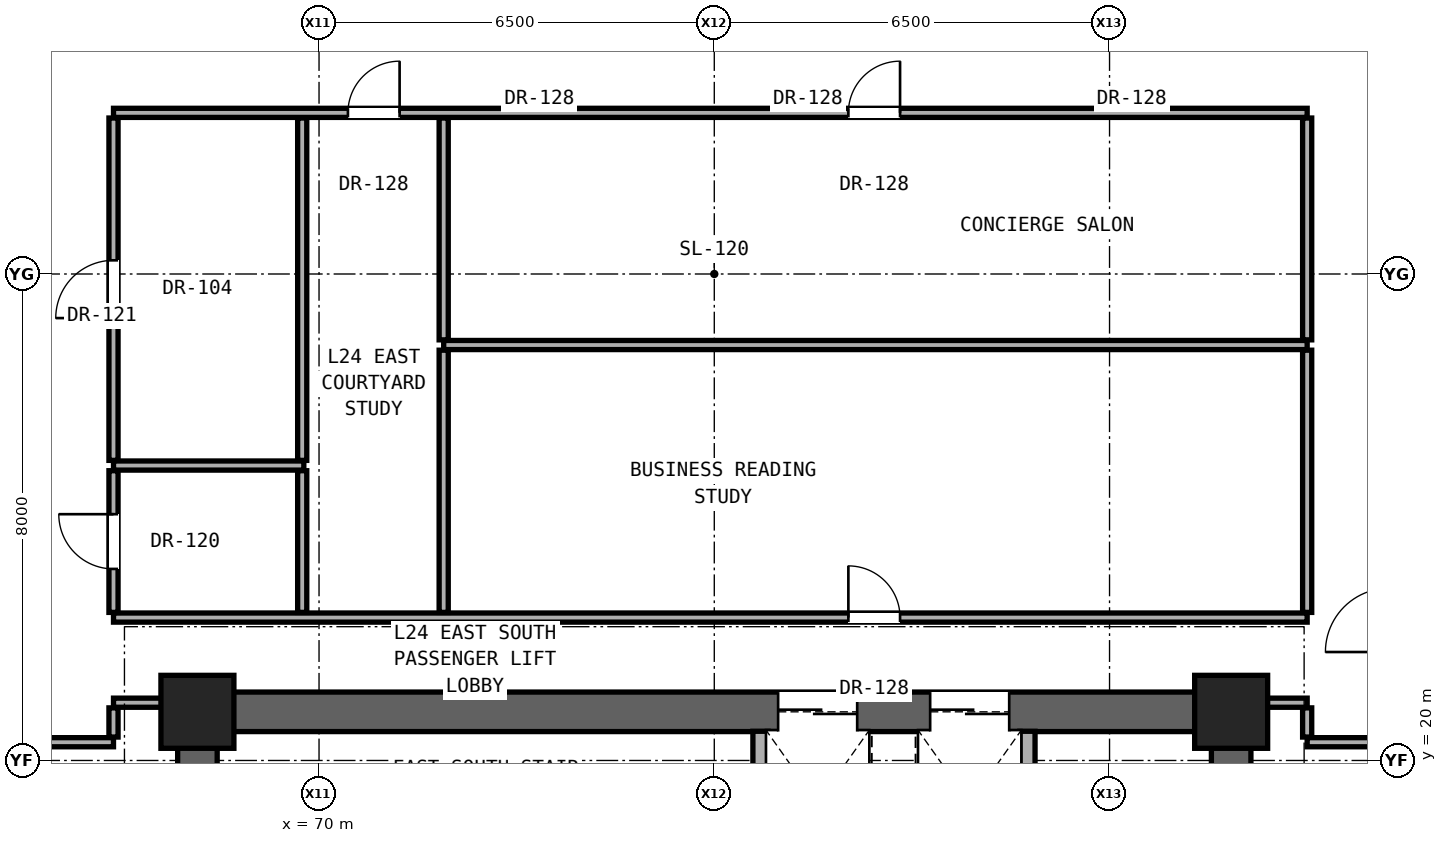
"""IFC4 building model, lengths in metres.
Left out: names, types, materials, properties, quantities, classifications, styles, units other than length and angle.
Written with IfcOpenShell. Run it as: python <this file> out.ifc"""

import sys

from ifc_helpers import new_model, si_unit, direction, frame, frame_2d, origin, origin_2d, place, context, subcontext, project, spatial, rectangle, extrude, element, fill, save


model = new_model("IFC4")
c1 = context("Model", 3, precision=1e-05, world=origin(), true_north=direction((0.0, 1.0)))
c2 = subcontext(c1, "Body", "Model", "MODEL_VIEW")
j1 = project(units=[si_unit("LENGTHUNIT", "METRE"), si_unit("PLANEANGLEUNIT", "RADIAN")], contexts=[c1])
p1 = place(None, origin())
s1 = spatial("IfcSite", under=j1, at=p1, CompositionType="ELEMENT")
p2 = place(p1, origin())
s2 = spatial("IfcBuilding", under=s1, at=p2, CompositionType="ELEMENT")
p3 = place(p2, frame((0.0, 0.0, 88.4)))
s3 = spatial("IfcBuildingStorey", under=s2, at=p3, CompositionType="ELEMENT", Elevation=88.4)
for number, where, z_axis, x_axis in (
    (1, (68.0, 20.8, 0.0), (0.0, 0.0, 1.0), (1.0, 0.0, 0.0)),
    (2, (85.0, 20.8, 0.0), (0.0, 0.0, 1.0), (1.0, 0.0, 0.0)),
):
    element("IfcColumn", number, at=place(p3, frame(where, z_axis=z_axis, x_axis=x_axis)), inside=s3, PredefinedType="COLUMN", context=c2, shape_type="SweptSolid", body=[
        extrude(rectangle(XDim=1.2, YDim=1.2, at=origin_2d()), origin(), (0.0, 0.0, 1.0), 3.3),
    ])
for number, where, z_axis, x_axis in (
    (3, (68.0, 15.2, 0.0), (0.0, 0.0, 1.0), (0.0, 1.0, 0.0)),
    (4, (85.0, 15.2, 0.0), (0.0, 0.0, 1.0), (0.0, 1.0, 0.0)),
):
    element("IfcWall", number, at=place(p3, frame(where, z_axis=z_axis, x_axis=x_axis)), inside=s3, PredefinedType="SHEAR", context=c2, shape_type="SweptSolid", body=[
        extrude(rectangle(XDim=5.6, YDim=0.65, at=frame_2d((2.8, 0.0))), origin(), (0.0, 0.0, 1.0), 3.08),
    ])
p4 = place(p3, frame((68.0, 20.8, 0.0), z_axis=(0.0, 0.0, 1.0), x_axis=(1.0, 0.0, 0.0)))
e5 = element("IfcWall", 5, at=p4, inside=s3, PredefinedType="SHEAR", context=c2, shape_type="SweptSolid", body=[
    extrude(rectangle(XDim=17.0, YDim=0.65, at=frame_2d((8.5, 0.0))), origin(), (0.0, 0.0, 1.0), 3.08),
])
p5 = place(p4, frame((9.55, 0.0, 0.0)))
e6 = element("IfcOpeningElement", 6, at=p5, cuts=e5, PredefinedType="OPENING", context=c2, shape_type="SweptSolid", body=[
    extrude(rectangle(XDim=1.3, YDim=2.3, at=frame_2d((0.65, 1.15))), frame((0.0, 0.335, 0.0), z_axis=(0.0, -1.0, 0.0), x_axis=(1.0, 0.0, 0.0)), (0.0, 0.0, 1.0), 0.67),
])
p6 = place(p4, frame((12.05, 0.0, 0.0)))
e7 = element("IfcOpeningElement", 7, at=p6, cuts=e5, PredefinedType="OPENING", context=c2, shape_type="SweptSolid", body=[
    extrude(rectangle(XDim=1.3, YDim=2.3, at=frame_2d((0.65, 1.15))), frame((0.0, 0.335, 0.0), z_axis=(0.0, -1.0, 0.0), x_axis=(1.0, 0.0, 0.0)), (0.0, 0.0, 1.0), 0.67),
])
p7 = place(p3, frame((65.25, 20.3, 0.0), z_axis=(0.0, 0.0, 1.0), x_axis=(1.0, 0.0, 0.0)))
e8 = element("IfcWall", 8, at=p7, inside=s3, PredefinedType="PARTITIONING", context=c2, shape_type="SweptSolid", body=[
    extrude(rectangle(XDim=1.37, YDim=0.15, at=frame_2d((0.685, 0.0))), origin(), (0.0, 0.0, 1.0), 3.08),
])
p8 = place(p3, frame((86.25, 20.3, 0.0), z_axis=(0.0, 0.0, 1.0), x_axis=(1.0, 0.0, 0.0)))
e9 = element("IfcWall", 9, at=p8, inside=s3, PredefinedType="PARTITIONING", context=c2, shape_type="SweptSolid", body=[
    extrude(rectangle(XDim=1.35, YDim=0.15, at=frame_2d((0.675, 0.0))), origin(), (0.0, 0.0, 1.0), 3.08),
])
p9 = place(p3, frame((66.62, 20.95, 0.0), z_axis=(0.0, 0.0, 1.0), x_axis=(1.0, 0.0, 0.0)))
e10 = element("IfcWall", 10, at=p9, inside=s3, PredefinedType="PARTITIONING", context=c2, shape_type="SweptSolid", body=[
    extrude(rectangle(XDim=1.06, YDim=0.15, at=frame_2d((0.53, 0.0))), origin(), (0.0, 0.0, 1.0), 2.472),
])
p10 = place(p3, frame((85.32, 20.95, 0.0), z_axis=(0.0, 0.0, 1.0), x_axis=(1.0, 0.0, 0.0)))
e11 = element("IfcWall", 11, at=p10, inside=s3, PredefinedType="PARTITIONING", context=c2, shape_type="SweptSolid", body=[
    extrude(rectangle(XDim=0.93, YDim=0.15, at=frame_2d((0.465, 0.0))), origin(), (0.0, 0.0, 1.0), 2.472),
])
p11 = place(p3, frame((66.62, 22.35, 0.0), z_axis=(0.0, 0.0, 1.0), x_axis=(1.0, 0.0, 0.0)))
e12 = element("IfcWall", 12, at=p11, inside=s3, PredefinedType="PARTITIONING", context=c2, shape_type="SweptSolid", body=[
    extrude(rectangle(XDim=19.63, YDim=0.15, at=frame_2d((9.815, 0.0))), origin(), (0.0, 0.0, 1.0), 2.145),
])
p12 = place(p11, frame((12.085, 0.0, 0.0)))
e13 = element("IfcOpeningElement", 13, at=p12, cuts=e12, PredefinedType="OPENING", context=c2, shape_type="SweptSolid", body=[
    extrude(rectangle(XDim=0.85, YDim=2.01, at=frame_2d((0.425, 1.005))), frame((0.0, 0.085, 0.0), z_axis=(0.0, -1.0, 0.0), x_axis=(1.0, 0.0, 0.0)), (0.0, 0.0, 1.0), 0.17),
])
p13 = place(p3, frame((66.62, 24.85, 0.0), z_axis=(0.0, 0.0, 1.0), x_axis=(1.0, 0.0, 0.0)))
e14 = element("IfcWall", 14, at=p13, inside=s3, PredefinedType="PARTITIONING", context=c2, shape_type="SweptSolid", body=[
    extrude(rectangle(XDim=3.13, YDim=0.15, at=frame_2d((1.565, 0.0))), origin(), (0.0, 0.0, 1.0), 2.145),
])
p14 = place(p3, frame((72.05, 26.832, 0.0), z_axis=(0.0, 0.0, 1.0), x_axis=(1.0, 0.0, 0.0)))
e15 = element("IfcWall", 15, at=p14, inside=s3, PredefinedType="PARTITIONING", context=c2, shape_type="SweptSolid", body=[
    extrude(rectangle(XDim=14.2, YDim=0.15, at=frame_2d((7.1, 0.0))), origin(), (0.0, 0.0, 1.0), 2.145),
])
p15 = place(p3, frame((66.62, 30.65, 0.0), z_axis=(0.0, 0.0, 1.0), x_axis=(1.0, 0.0, 0.0)))
e16 = element("IfcWall", 16, at=p15, inside=s3, PredefinedType="PARTITIONING", context=c2, shape_type="SweptSolid", body=[
    extrude(rectangle(XDim=19.63, YDim=0.15, at=frame_2d((9.815, 0.0))), origin(), (0.0, 0.0, 1.0), 2.145),
])
p16 = place(p15, frame((3.855, 0.0, 0.0)))
e17 = element("IfcOpeningElement", 17, at=p16, cuts=e16, PredefinedType="OPENING", context=c2, shape_type="SweptSolid", body=[
    extrude(rectangle(XDim=0.85, YDim=2.01, at=frame_2d((0.425, 1.005))), frame((0.0, 0.085, 0.0), z_axis=(0.0, -1.0, 0.0), x_axis=(1.0, 0.0, 0.0)), (0.0, 0.0, 1.0), 0.17),
])
p17 = place(p15, frame((12.085, 0.0, 0.0)))
e18 = element("IfcOpeningElement", 18, at=p17, cuts=e16, PredefinedType="OPENING", context=c2, shape_type="SweptSolid", body=[
    extrude(rectangle(XDim=0.85, YDim=2.01, at=frame_2d((0.425, 1.005))), frame((0.0, 0.085, 0.0), z_axis=(0.0, -1.0, 0.0), x_axis=(1.0, 0.0, 0.0)), (0.0, 0.0, 1.0), 0.17),
])
p18 = place(p3, frame((66.62, 20.385, 0.0), z_axis=(0.0, 0.0, 1.0), x_axis=(0.0, 1.0, 0.0)))
e19 = element("IfcWall", 19, at=p18, inside=s3, PredefinedType="PARTITIONING", context=c2, shape_type="SweptSolid", body=[
    extrude(rectangle(XDim=0.48, YDim=0.15, at=frame_2d((0.24, 0.0))), origin(), (0.0, 0.0, 1.0), 2.472),
])
p19 = place(p3, frame((66.62, 22.435, 0.0), z_axis=(0.0, 0.0, 1.0), x_axis=(0.0, 1.0, 0.0)))
e20 = element("IfcWall", 20, at=p19, inside=s3, PredefinedType="PARTITIONING", context=c2, shape_type="SweptSolid", body=[
    extrude(rectangle(XDim=2.33, YDim=0.15, at=frame_2d((1.165, 0.0))), origin(), (0.0, 0.0, 1.0), 3.08),
])
p20 = place(p19, frame((0.715, 0.0, 0.0)))
e21 = element("IfcOpeningElement", 21, at=p20, cuts=e20, PredefinedType="OPENING", context=c2, shape_type="SweptSolid", body=[
    extrude(rectangle(XDim=0.9, YDim=2.1, at=frame_2d((0.45, 1.05))), frame((0.0, 0.085, 0.0), z_axis=(0.0, -1.0, 0.0), x_axis=(1.0, 0.0, 0.0)), (0.0, 0.0, 1.0), 0.17),
])
p21 = place(p3, frame((66.62, 24.935, 0.0), z_axis=(0.0, 0.0, 1.0), x_axis=(0.0, 1.0, 0.0)))
e22 = element("IfcWall", 22, at=p21, inside=s3, PredefinedType="PARTITIONING", context=c2, shape_type="SweptSolid", body=[
    extrude(rectangle(XDim=5.63, YDim=0.15, at=frame_2d((2.815, 0.0))), origin(), (0.0, 0.0, 1.0), 2.299),
])
p22 = place(p21, frame((2.34, 0.0, 0.0)))
e23 = element("IfcOpeningElement", 23, at=p22, cuts=e22, PredefinedType="OPENING", context=c2, shape_type="SweptSolid", body=[
    extrude(rectangle(XDim=0.95, YDim=2.15, at=frame_2d((0.475, 1.075))), frame((0.0, 0.085, 0.0), z_axis=(0.0, -1.0, 0.0), x_axis=(1.0, 0.0, 0.0)), (0.0, 0.0, 1.0), 0.17),
])
p23 = place(p3, frame((69.723, 22.435, 0.0), z_axis=(0.0, 0.0, 1.0), x_axis=(0.0, 1.0, 0.0)))
e24 = element("IfcWall", 24, at=p23, inside=s3, PredefinedType="PARTITIONING", context=c2, shape_type="SweptSolid", body=[
    extrude(rectangle(XDim=2.33, YDim=0.15, at=frame_2d((1.165, 0.0))), origin(), (0.0, 0.0, 1.0), 3.08),
])
p24 = place(p3, frame((69.723, 24.935, 0.0), z_axis=(0.0, 0.0, 1.0), x_axis=(0.0, 1.0, 0.0)))
e25 = element("IfcWall", 25, at=p24, inside=s3, PredefinedType="PARTITIONING", context=c2, shape_type="SweptSolid", body=[
    extrude(rectangle(XDim=5.63, YDim=0.15, at=frame_2d((2.815, 0.0))), origin(), (0.0, 0.0, 1.0), 2.145),
])
p25 = place(p3, frame((72.05, 22.435, 0.0), z_axis=(0.0, 0.0, 1.0), x_axis=(0.0, 1.0, 0.0)))
e26 = element("IfcWall", 26, at=p25, inside=s3, PredefinedType="PARTITIONING", context=c2, shape_type="SweptSolid", body=[
    extrude(rectangle(XDim=4.312, YDim=0.15, at=frame_2d((2.156, 0.0))), origin(), (0.0, 0.0, 1.0), 2.609),
])
p26 = place(p3, frame((72.05, 26.917, 0.0), z_axis=(0.0, 0.0, 1.0), x_axis=(0.0, 1.0, 0.0)))
e27 = element("IfcWall", 27, at=p26, inside=s3, PredefinedType="PARTITIONING", context=c2, shape_type="SweptSolid", body=[
    extrude(rectangle(XDim=3.648, YDim=0.15, at=frame_2d((1.824, 0.0))), origin(), (0.0, 0.0, 1.0), 2.145),
])
p27 = place(p3, frame((77.26, 18.735, 0.0), z_axis=(0.0, 0.0, 1.0), x_axis=(0.0, 1.0, 0.0)))
e28 = element("IfcWall", 28, at=p27, inside=s3, PredefinedType="SOLIDWALL", context=c2, shape_type="SweptSolid", body=[
    extrude(rectangle(XDim=1.745, YDim=0.25, at=frame_2d((0.873, 0.0))), origin(), (0.0, 0.0, 1.0), 3.08),
])
p28 = place(p3, frame((81.65, 18.185, 0.0), z_axis=(0.0, 0.0, 1.0), x_axis=(0.0, 1.0, 0.0)))
e29 = element("IfcWall", 29, at=p28, inside=s3, PredefinedType="SOLIDWALL", context=c2, shape_type="SweptSolid", body=[
    extrude(rectangle(XDim=2.295, YDim=0.25, at=frame_2d((1.147, 0.0))), origin(), (0.0, 0.0, 1.0), 3.08),
])
p29 = place(p3, frame((86.25, 20.385, 0.0), z_axis=(0.0, 0.0, 1.0), x_axis=(0.0, 1.0, 0.0)))
e30 = element("IfcWall", 30, at=p29, inside=s3, PredefinedType="PARTITIONING", context=c2, shape_type="SweptSolid", body=[
    extrude(rectangle(XDim=0.48, YDim=0.15, at=frame_2d((0.24, 0.0))), origin(), (0.0, 0.0, 1.0), 2.472),
])
p30 = place(p3, frame((86.25, 22.435, 0.0), z_axis=(0.0, 0.0, 1.0), x_axis=(0.0, 1.0, 0.0)))
e31 = element("IfcWall", 31, at=p30, inside=s3, PredefinedType="PARTITIONING", context=c2, shape_type="SweptSolid", body=[
    extrude(rectangle(XDim=4.312, YDim=0.15, at=frame_2d((2.156, 0.0))), origin(), (0.0, 0.0, 1.0), 3.08),
])
p31 = place(p3, frame((86.25, 26.917, 0.0), z_axis=(0.0, 0.0, 1.0), x_axis=(0.0, 1.0, 0.0)))
e32 = element("IfcWall", 32, at=p31, inside=s3, PredefinedType="PARTITIONING", context=c2, shape_type="SweptSolid", body=[
    extrude(rectangle(XDim=3.648, YDim=0.15, at=frame_2d((1.824, 0.0))), origin(), (0.0, 0.0, 1.0), 2.299),
])
p32 = place(p20, origin())
e33 = element("IfcDoor", 33, at=p32, inside=s3, OperationType="SINGLE_SWING_RIGHT", PredefinedType="DOOR", context=c2, shape_type="SweptSolid", body=[
    extrude(rectangle(XDim=0.9, YDim=2.1, at=frame_2d((0.45, 1.05))), frame((0.0, 0.025, 0.0), z_axis=(0.0, -1.0, 0.0), x_axis=(1.0, 0.0, 0.0)), (0.0, 0.0, 1.0), 0.05),
])
fill(e21, e33)
p33 = place(p22, origin())
e34 = element("IfcDoor", 34, at=p33, inside=s3, OperationType="SINGLE_SWING_LEFT", PredefinedType="DOOR", context=c2, shape_type="SweptSolid", body=[
    extrude(rectangle(XDim=0.95, YDim=2.15, at=frame_2d((0.475, 1.075))), frame((0.0, 0.025, 0.0), z_axis=(0.0, -1.0, 0.0), x_axis=(1.0, 0.0, 0.0)), (0.0, 0.0, 1.0), 0.05),
])
fill(e23, e34)
p34 = place(p16, origin())
e35 = element("IfcDoor", 35, at=p34, inside=s3, OperationType="SINGLE_SWING_RIGHT", PredefinedType="DOOR", context=c2, shape_type="SweptSolid", body=[
    extrude(rectangle(XDim=0.85, YDim=2.01, at=frame_2d((0.425, 1.005))), frame((0.0, 0.025, 0.0), z_axis=(0.0, -1.0, 0.0), x_axis=(1.0, 0.0, 0.0)), (0.0, 0.0, 1.0), 0.05),
])
fill(e17, e35)
p35 = place(p12, origin())
e36 = element("IfcDoor", 36, at=p35, inside=s3, OperationType="SINGLE_SWING_LEFT", PredefinedType="DOOR", context=c2, shape_type="SweptSolid", body=[
    extrude(rectangle(XDim=0.85, YDim=2.01, at=frame_2d((0.425, 1.005))), frame((0.0, 0.025, 0.0), z_axis=(0.0, -1.0, 0.0), x_axis=(1.0, 0.0, 0.0)), (0.0, 0.0, 1.0), 0.05),
])
fill(e13, e36)
p36 = place(p17, origin())
e37 = element("IfcDoor", 37, at=p36, inside=s3, OperationType="SINGLE_SWING_RIGHT", PredefinedType="DOOR", context=c2, shape_type="SweptSolid", body=[
    extrude(rectangle(XDim=0.85, YDim=2.01, at=frame_2d((0.425, 1.005))), frame((0.0, 0.025, 0.0), z_axis=(0.0, -1.0, 0.0), x_axis=(1.0, 0.0, 0.0)), (0.0, 0.0, 1.0), 0.05),
])
fill(e18, e37)
p37 = place(p5, origin())
e38 = element("IfcDoor", 38, at=p37, inside=s3, OperationType="DOUBLE_DOOR_SLIDING", PredefinedType="DOOR", context=c2, shape_type="SweptSolid", body=[
    extrude(rectangle(XDim=1.3, YDim=2.3, at=frame_2d((0.65, 1.15))), frame((0.0, 0.025, 0.0), z_axis=(0.0, -1.0, 0.0), x_axis=(1.0, 0.0, 0.0)), (0.0, 0.0, 1.0), 0.05),
])
fill(e6, e38)
p38 = place(p6, origin())
e39 = element("IfcDoor", 39, at=p38, inside=s3, OperationType="DOUBLE_DOOR_SLIDING", PredefinedType="DOOR", context=c2, shape_type="SweptSolid", body=[
    extrude(rectangle(XDim=1.3, YDim=2.3, at=frame_2d((0.65, 1.15))), frame((0.0, 0.025, 0.0), z_axis=(0.0, -1.0, 0.0), x_axis=(1.0, 0.0, 0.0)), (0.0, 0.0, 1.0), 0.05),
])
fill(e7, e39)
save(model, sys.argv[1])
